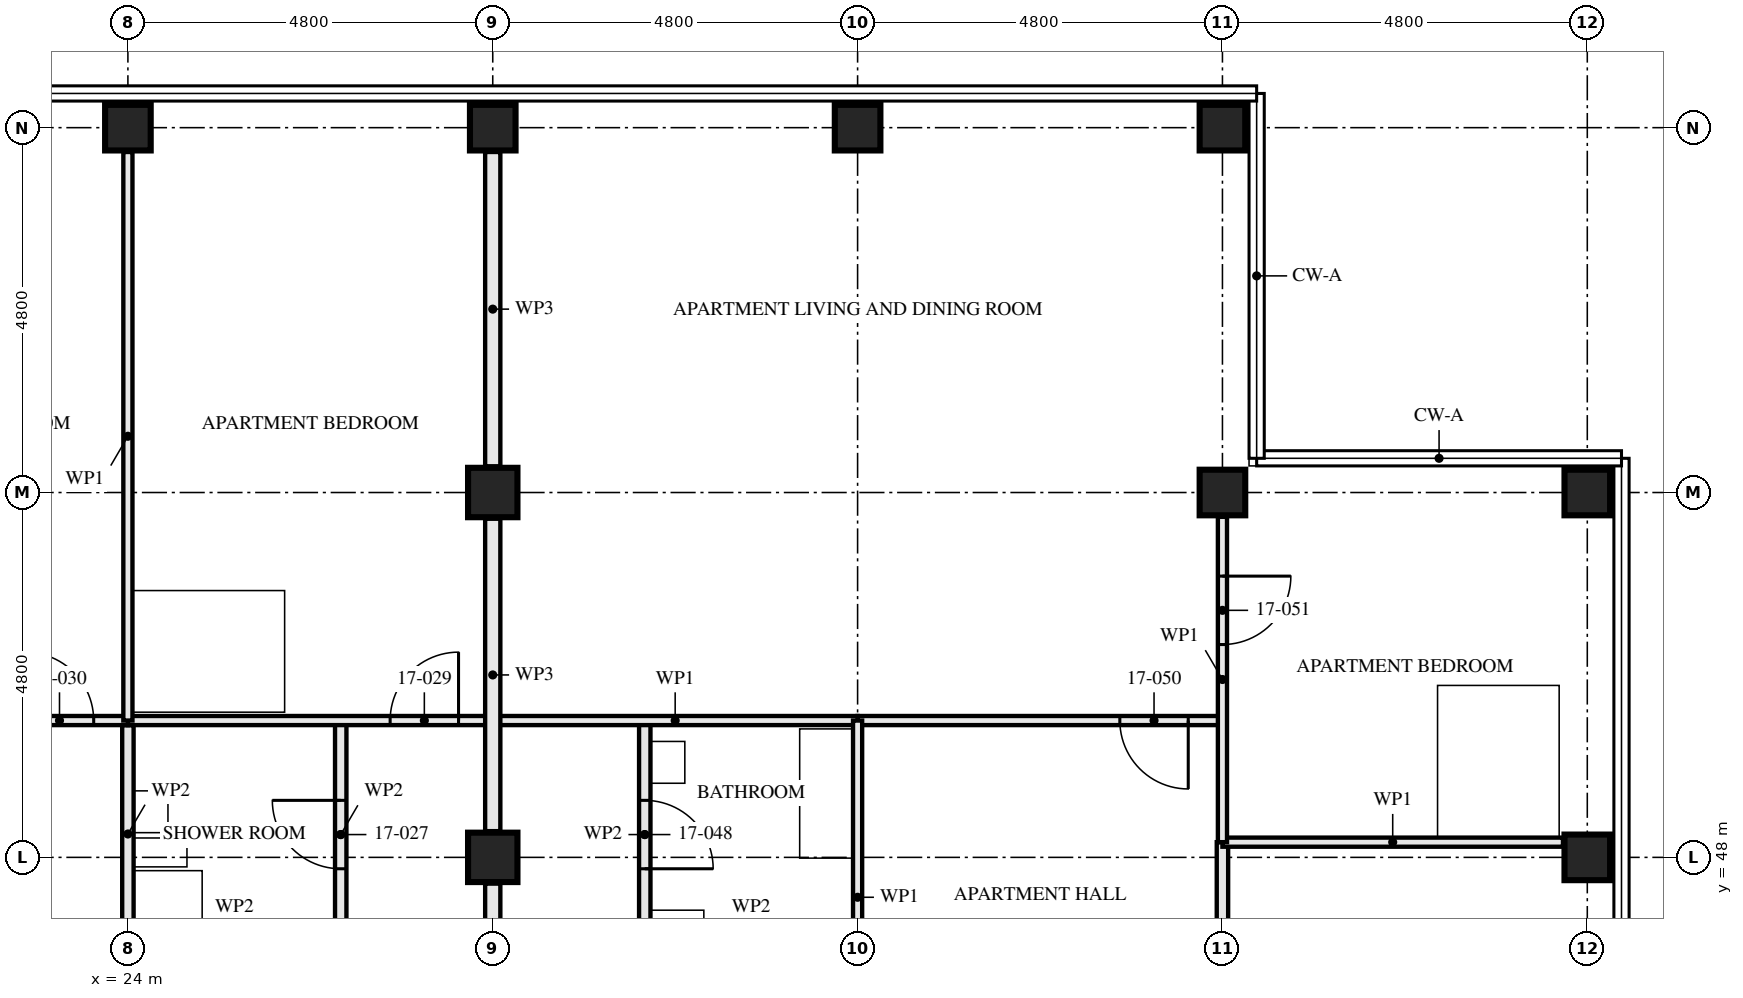
"""IFC4 building model, lengths in metres.
Left out: names, types, materials, properties, quantities, classifications, styles, units other than length and angle.
Written with IfcOpenShell. Run it as: python <this file> out.ifc"""

import sys

from ifc_helpers import new_model, si_unit, direction, frame, frame_2d, origin, origin_2d, place, context, subcontext, project, spatial, rectangle, hollow_rectangle, extrude, element, fill, save


model = new_model("IFC4")
c1 = context("Model", 3, precision=1e-05, world=origin(), true_north=direction((0.0, 1.0)))
c2 = subcontext(c1, "Body", "Model", "MODEL_VIEW")
j1 = project(units=[si_unit("LENGTHUNIT", "METRE"), si_unit("PLANEANGLEUNIT", "RADIAN")], contexts=[c1])
p1 = place(None, origin())
s1 = spatial("IfcSite", under=j1, at=p1, CompositionType="ELEMENT")
p2 = place(p1, origin())
s2 = spatial("IfcBuilding", under=s1, at=p2, CompositionType="ELEMENT")
p3 = place(p2, frame((0.0, 0.0, 65.5)))
s3 = spatial("IfcBuildingStorey", under=s2, at=p3, CompositionType="ELEMENT", Elevation=65.5)
p4 = place(p3, frame((24.0, 57.6, 0.0), z_axis=(0.0, 0.0, 1.0), x_axis=(0.0, 1.0, 0.0)))
e1 = element("IfcColumn", 1, at=p4, inside=s3, PredefinedType="COLUMN", context=c2, shape_type="SweptSolid", body=[
    extrude(hollow_rectangle(XDim=0.6, YDim=0.6, WallThickness=0.08, at=origin_2d()), origin(), (0.0, 0.0, 1.0), 3.5),
])
for number, where, z_axis, x_axis in (
    (2, (28.8, 48.0, 0.0), (0.0, 0.0, 1.0), (1.0, 0.0, 0.0)),
    (3, (28.8, 52.8, 0.0), (0.0, 0.0, 1.0), (1.0, 0.0, 0.0)),
):
    element("IfcColumn", number, at=place(p3, frame(where, z_axis=z_axis, x_axis=x_axis)), inside=s3, PredefinedType="COLUMN", context=c2, shape_type="SweptSolid", body=[
        extrude(hollow_rectangle(XDim=0.65, YDim=0.65, WallThickness=0.05, at=origin_2d()), origin(), (0.0, 0.0, 1.0), 3.5),
    ])
for number, where, z_axis, x_axis in (
    (4, (28.8, 57.6, 0.0), (0.0, 0.0, 1.0), (0.0, 1.0, 0.0)),
    (5, (33.6, 57.6, 0.0), (0.0, 0.0, 1.0), (0.0, 1.0, 0.0)),
    (6, (38.4, 52.8, 0.0), (0.0, 0.0, 1.0), (0.0, 1.0, 0.0)),
    (7, (38.4, 57.6, 0.0), (0.0, 0.0, 1.0), (0.0, 1.0, 0.0)),
    (8, (43.2, 48.0, 0.0), (0.0, 0.0, 1.0), (1.0, 0.0, 0.0)),
    (9, (43.2, 52.8, 0.0), (0.0, 0.0, 1.0), (0.0, 1.0, 0.0)),
):
    element("IfcColumn", number, at=place(p3, frame(where, z_axis=z_axis, x_axis=x_axis)), inside=s3, PredefinedType="COLUMN", context=c2, shape_type="SweptSolid", body=[
        extrude(hollow_rectangle(XDim=0.6, YDim=0.6, WallThickness=0.08, at=origin_2d()), origin(), (0.0, 0.0, 1.0), 3.5),
    ])
p5 = place(p3, frame((26.8, 49.8, 0.0), z_axis=(0.0, 0.0, 1.0), x_axis=(0.0, -1.0, 0.0)))
e10 = element("IfcWall", 10, at=p5, inside=s3, PredefinedType="PARTITIONING", context=c2, shape_type="SweptSolid", body=[
    extrude(rectangle(XDim=3.0, YDim=0.15, at=frame_2d((1.5, 0.0))), origin(), (0.0, 0.0, 1.0), 2.55),
])
p6 = place(p5, frame((1.05, 0.0, 0.0)))
e11 = element("IfcOpeningElement", 11, at=p6, cuts=e10, PredefinedType="OPENING", context=c2, shape_type="SweptSolid", body=[
    extrude(rectangle(XDim=0.9, YDim=2.1, at=frame_2d((0.45, 1.05))), frame((0.0, 0.085, 0.0), z_axis=(0.0, -1.0, 0.0), x_axis=(1.0, 0.0, 0.0)), (0.0, 0.0, 1.0), 0.171),
])
p7 = place(p3, frame((28.8, 49.8, 0.0), z_axis=(0.0, 0.0, 1.0), x_axis=(-1.0, 0.0, 0.0)))
e12 = element("IfcWall", 12, at=p7, inside=s3, PredefinedType="PARTITIONING", context=c2, shape_type="SweptSolid", body=[
    extrude(rectangle(XDim=4.8, YDim=0.12, at=frame_2d((2.4, 0.0))), origin(), (0.0, 0.0, 1.0), 3.33),
])
p8 = place(p7, frame((0.45, 0.0, 0.0)))
e13 = element("IfcOpeningElement", 13, at=p8, cuts=e12, PredefinedType="OPENING", context=c2, shape_type="SweptSolid", body=[
    extrude(rectangle(XDim=0.9, YDim=2.1, at=frame_2d((0.45, 1.05))), frame((0.0, 0.071, 0.0), z_axis=(0.0, -1.0, 0.0), x_axis=(1.0, 0.0, 0.0)), (0.0, 0.0, 1.0), 0.141),
])
p9 = place(p3, frame((24.0, 49.8, 0.0), z_axis=(0.0, 0.0, 1.0), x_axis=(-1.0, 0.0, 0.0)))
e14 = element("IfcWall", 14, at=p9, inside=s3, PredefinedType="PARTITIONING", context=c2, shape_type="SweptSolid", body=[
    extrude(rectangle(XDim=4.8, YDim=0.12, at=frame_2d((2.4, 0.0))), origin(), (0.0, 0.0, 1.0), 3.33),
])
p10 = place(p9, frame((0.45, 0.0, 0.0)))
e15 = element("IfcOpeningElement", 15, at=p10, cuts=e14, PredefinedType="OPENING", context=c2, shape_type="SweptSolid", body=[
    extrude(rectangle(XDim=0.9, YDim=2.1, at=frame_2d((0.45, 1.05))), frame((0.0, 0.071, 0.0), z_axis=(0.0, -1.0, 0.0), x_axis=(1.0, 0.0, 0.0)), (0.0, 0.0, 1.0), 0.141),
])
p11 = place(p3, frame((24.0, 57.28, 0.0), z_axis=(0.0, 0.0, 1.0), x_axis=(0.0, -1.0, 0.0)))
e16 = element("IfcWall", 16, at=p11, inside=s3, PredefinedType="PARTITIONING", context=c2, shape_type="SweptSolid", body=[
    extrude(rectangle(XDim=7.48, YDim=0.12, at=frame_2d((3.74, 0.0))), origin(), (0.0, 0.0, 1.0), 2.55),
])
p12 = place(p3, frame((38.4, 48.2, 0.0), z_axis=(0.0, 0.0, 1.0), x_axis=(0.0, -1.0, 0.0)))
e17 = element("IfcWall", 17, at=p12, inside=s3, PredefinedType="PARTITIONING", context=c2, shape_type="SweptSolid", body=[
    extrude(rectangle(XDim=3.0, YDim=0.15, at=frame_2d((1.5, 0.0))), origin(), (0.0, 0.0, 1.0), 2.55),
])
p13 = place(p12, frame((1.05, 0.0, 0.0)))
e18 = element("IfcOpeningElement", 18, at=p13, cuts=e17, PredefinedType="OPENING", context=c2, shape_type="SweptSolid", body=[
    extrude(rectangle(XDim=0.9, YDim=2.1, at=frame_2d((0.45, 1.05))), frame((0.0, 0.085, 0.0), z_axis=(0.0, -1.0, 0.0), x_axis=(1.0, 0.0, 0.0)), (0.0, 0.0, 1.0), 0.171),
])
p14 = place(p3, frame((30.8, 49.8, 0.0), z_axis=(0.0, 0.0, 1.0), x_axis=(0.0, -1.0, 0.0)))
e19 = element("IfcWall", 19, at=p14, inside=s3, PredefinedType="PARTITIONING", context=c2, shape_type="SweptSolid", body=[
    extrude(rectangle(XDim=3.0, YDim=0.15, at=frame_2d((1.5, 0.0))), origin(), (0.0, 0.0, 1.0), 2.55),
])
p15 = place(p14, frame((1.05, 0.0, 0.0)))
e20 = element("IfcOpeningElement", 20, at=p15, cuts=e19, PredefinedType="OPENING", context=c2, shape_type="SweptSolid", body=[
    extrude(rectangle(XDim=0.9, YDim=2.1, at=frame_2d((0.45, 1.05))), frame((0.0, 0.085, 0.0), z_axis=(0.0, -1.0, 0.0), x_axis=(1.0, 0.0, 0.0)), (0.0, 0.0, 1.0), 0.171),
])
p16 = place(p3, frame((33.6, 49.8, 0.0), z_axis=(0.0, 0.0, 1.0), x_axis=(0.0, -1.0, 0.0)))
e21 = element("IfcWall", 21, at=p16, inside=s3, PredefinedType="PARTITIONING", context=c2, shape_type="SweptSolid", body=[
    extrude(rectangle(XDim=4.65, YDim=0.12, at=frame_2d((2.325, 0.0))), origin(), (0.0, 0.0, 1.0), 2.55),
])
p17 = place(p16, frame((3.35, 0.0, 0.0)))
e22 = element("IfcOpeningElement", 22, at=p17, cuts=e21, PredefinedType="OPENING", context=c2, shape_type="SweptSolid", body=[
    extrude(rectangle(XDim=0.9, YDim=2.1, at=frame_2d((0.45, 1.05))), frame((0.0, 0.071, 0.0), z_axis=(0.0, -1.0, 0.0), x_axis=(1.0, 0.0, 0.0)), (0.0, 0.0, 1.0), 0.141),
])
p18 = place(p3, frame((42.88, 48.2, 0.0), z_axis=(0.0, 0.0, 1.0), x_axis=(-1.0, 0.0, 0.0)))
e23 = element("IfcWall", 23, at=p18, inside=s3, PredefinedType="PARTITIONING", context=c2, shape_type="SweptSolid", body=[
    extrude(rectangle(XDim=4.48, YDim=0.12, at=frame_2d((2.24, 0.0))), origin(), (0.0, 0.0, 1.0), 3.33),
])
p19 = place(p3, frame((38.4, 49.8, 0.0), z_axis=(0.0, 0.0, 1.0), x_axis=(-1.0, 0.0, 0.0)))
e24 = element("IfcWall", 24, at=p19, inside=s3, PredefinedType="PARTITIONING", context=c2, shape_type="SweptSolid", body=[
    extrude(rectangle(XDim=4.8, YDim=0.12, at=frame_2d((2.4, 0.0))), origin(), (0.0, 0.0, 1.0), 3.33),
])
p20 = place(p19, frame((0.45, 0.0, 0.0)))
e25 = element("IfcOpeningElement", 25, at=p20, cuts=e24, PredefinedType="OPENING", context=c2, shape_type="SweptSolid", body=[
    extrude(rectangle(XDim=0.9, YDim=2.1, at=frame_2d((0.45, 1.05))), frame((0.0, 0.071, 0.0), z_axis=(0.0, -1.0, 0.0), x_axis=(1.0, 0.0, 0.0)), (0.0, 0.0, 1.0), 0.141),
])
p21 = place(p3, frame((33.6, 49.8, 0.0), z_axis=(0.0, 0.0, 1.0), x_axis=(-1.0, 0.0, 0.0)))
e26 = element("IfcWall", 26, at=p21, inside=s3, PredefinedType="PARTITIONING", context=c2, shape_type="SweptSolid", body=[
    extrude(rectangle(XDim=4.8, YDim=0.12, at=frame_2d((2.4, 0.0))), origin(), (0.0, 0.0, 1.0), 3.33),
])
p22 = place(p3, frame((38.4, 52.48, 0.0), z_axis=(0.0, 0.0, 1.0), x_axis=(0.0, -1.0, 0.0)))
e27 = element("IfcWall", 27, at=p22, inside=s3, PredefinedType="PARTITIONING", context=c2, shape_type="SweptSolid", body=[
    extrude(rectangle(XDim=4.28, YDim=0.12, at=frame_2d((2.14, 0.0))), origin(), (0.0, 0.0, 1.0), 3.33),
])
p23 = place(p22, frame((0.78, 0.0, 0.0)))
e28 = element("IfcOpeningElement", 28, at=p23, cuts=e27, PredefinedType="OPENING", context=c2, shape_type="SweptSolid", body=[
    extrude(rectangle(XDim=0.9, YDim=2.1, at=frame_2d((0.45, 1.05))), frame((0.0, 0.071, 0.0), z_axis=(0.0, -1.0, 0.0), x_axis=(1.0, 0.0, 0.0)), (0.0, 0.0, 1.0), 0.141),
])
p24 = place(p3, frame((28.8, 45.1, 0.0), z_axis=(0.0, 0.0, 1.0), x_axis=(0.0, 1.0, 0.0)))
e29 = element("IfcWall", 29, at=p24, inside=s3, PredefinedType="PARTITIONING", context=c2, shape_type="SweptSolid", body=[
    extrude(rectangle(XDim=2.555, YDim=0.2, at=frame_2d((1.277, 0.0))), origin(), (0.0, 0.0, 1.0), 2.32),
])
p25 = place(p3, frame((28.8, 48.345, 0.0), z_axis=(0.0, 0.0, 1.0), x_axis=(0.0, 1.0, 0.0)))
e30 = element("IfcWall", 30, at=p25, inside=s3, PredefinedType="PARTITIONING", context=c2, shape_type="SweptSolid", body=[
    extrude(rectangle(XDim=4.11, YDim=0.2, at=frame_2d((2.055, 0.0))), origin(), (0.0, 0.0, 1.0), 2.32),
])
p26 = place(p3, frame((28.8, 53.145, 0.0), z_axis=(0.0, 0.0, 1.0), x_axis=(0.0, 1.0, 0.0)))
e31 = element("IfcWall", 31, at=p26, inside=s3, PredefinedType="PARTITIONING", context=c2, shape_type="SweptSolid", body=[
    extrude(rectangle(XDim=4.135, YDim=0.2, at=frame_2d((2.067, 0.0))), origin(), (0.0, 0.0, 1.0), 2.32),
])
p27 = place(p3, frame((24.0, 46.875, 0.0), z_axis=(0.0, 0.0, 1.0), x_axis=(0.0, 1.0, 0.0)))
e32 = element("IfcWall", 32, at=p27, inside=s3, PredefinedType="PARTITIONING", context=c2, shape_type="SweptSolid", body=[
    extrude(rectangle(XDim=2.865, YDim=0.15, at=frame_2d((1.433, 0.0))), origin(), (0.0, 0.0, 1.0), 2.55),
])
p28 = place(p6, frame((0.9, 0.0, 0.0), z_axis=(0.0, 0.0, 1.0), x_axis=(-1.0, 0.0, 0.0)))
e33 = element("IfcDoor", 33, at=p28, inside=s3, OperationType="SINGLE_SWING_LEFT", PredefinedType="DOOR", context=c2, shape_type="SweptSolid", body=[
    extrude(rectangle(XDim=0.9, YDim=2.1, at=frame_2d((0.45, 1.05))), frame((0.0, 0.022, 0.0), z_axis=(0.0, -1.0, 0.0), x_axis=(1.0, 0.0, 0.0)), (0.0, 0.0, 1.0), 0.044),
])
fill(e11, e33)
p29 = place(p8, frame((0.9, 0.0, 0.0), z_axis=(0.0, 0.0, 1.0), x_axis=(-1.0, 0.0, 0.0)))
e34 = element("IfcDoor", 34, at=p29, inside=s3, OperationType="SINGLE_SWING_LEFT", PredefinedType="DOOR", context=c2, shape_type="SweptSolid", body=[
    extrude(rectangle(XDim=0.9, YDim=2.1, at=frame_2d((0.45, 1.05))), frame((0.0, 0.022, 0.0), z_axis=(0.0, -1.0, 0.0), x_axis=(1.0, 0.0, 0.0)), (0.0, 0.0, 1.0), 0.044),
])
fill(e13, e34)
p30 = place(p10, frame((0.9, 0.0, 0.0), z_axis=(0.0, 0.0, 1.0), x_axis=(-1.0, 0.0, 0.0)))
e35 = element("IfcDoor", 35, at=p30, inside=s3, OperationType="SINGLE_SWING_RIGHT", PredefinedType="DOOR", context=c2, shape_type="SweptSolid", body=[
    extrude(rectangle(XDim=0.9, YDim=2.1, at=frame_2d((0.45, 1.05))), frame((0.0, 0.022, 0.0), z_axis=(0.0, -1.0, 0.0), x_axis=(1.0, 0.0, 0.0)), (0.0, 0.0, 1.0), 0.044),
])
fill(e15, e35)
p31 = place(p15, origin())
e36 = element("IfcDoor", 36, at=p31, inside=s3, OperationType="SINGLE_SWING_LEFT", PredefinedType="DOOR", context=c2, shape_type="SweptSolid", body=[
    extrude(rectangle(XDim=0.9, YDim=2.1, at=frame_2d((0.45, 1.05))), frame((0.0, 0.022, 0.0), z_axis=(0.0, -1.0, 0.0), x_axis=(1.0, 0.0, 0.0)), (0.0, 0.0, 1.0), 0.044),
])
fill(e20, e36)
p32 = place(p20, origin())
e37 = element("IfcDoor", 37, at=p32, inside=s3, OperationType="SINGLE_SWING_RIGHT", PredefinedType="DOOR", context=c2, shape_type="SweptSolid", body=[
    extrude(rectangle(XDim=0.9, YDim=2.1, at=frame_2d((0.45, 1.05))), frame((0.0, 0.022, 0.0), z_axis=(0.0, -1.0, 0.0), x_axis=(1.0, 0.0, 0.0)), (0.0, 0.0, 1.0), 0.044),
])
fill(e25, e37)
p33 = place(p23, origin())
e38 = element("IfcDoor", 38, at=p33, inside=s3, OperationType="SINGLE_SWING_RIGHT", PredefinedType="DOOR", context=c2, shape_type="SweptSolid", body=[
    extrude(rectangle(XDim=0.9, YDim=2.1, at=frame_2d((0.45, 1.05))), frame((0.0, 0.022, 0.0), z_axis=(0.0, -1.0, 0.0), x_axis=(1.0, 0.0, 0.0)), (0.0, 0.0, 1.0), 0.044),
])
fill(e28, e38)
save(model, sys.argv[1])
